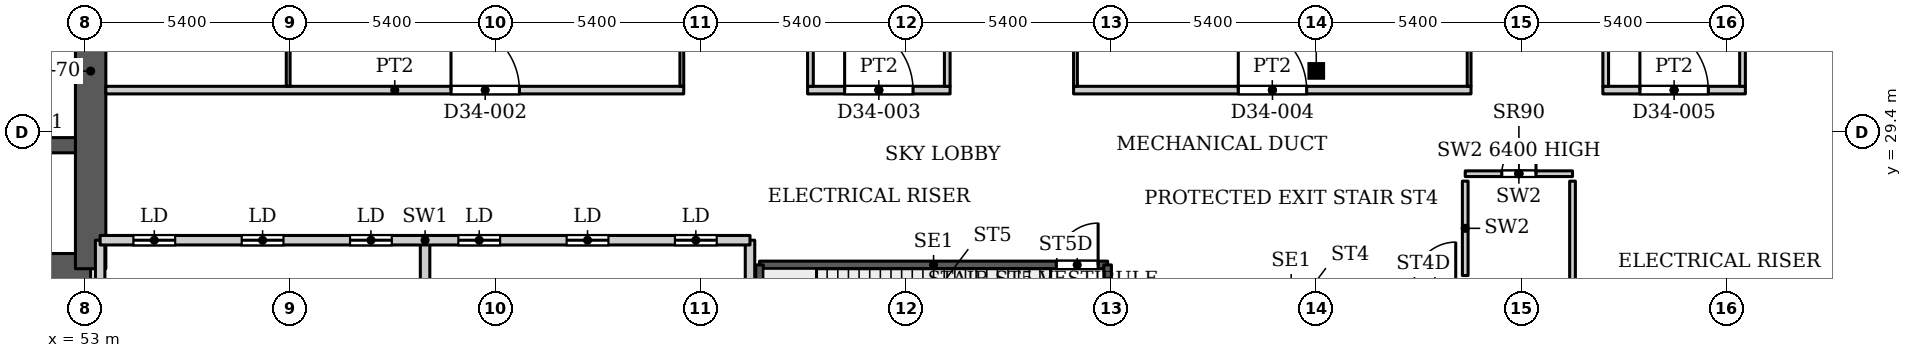
"""IFC4 building model, lengths in metres.
Left out: names, types, materials, properties, quantities, classifications, styles, units other than length and angle.
Written with IfcOpenShell. Run it as: python <this file> out.ifc"""

import sys

from ifc_helpers import new_model, si_unit, direction, frame, frame_2d, origin, origin_2d, place, context, subcontext, project, spatial, rectangle, hollow_rectangle, extrude, source, transform, mapped, element, fill, save


model = new_model("IFC4")
c1 = context("Model", 3, precision=1e-05, world=origin(), true_north=direction((0.0, 1.0)))
c2 = subcontext(c1, "Body", "Model", "MODEL_VIEW")
j1 = project(units=[si_unit("LENGTHUNIT", "METRE"), si_unit("PLANEANGLEUNIT", "RADIAN")], contexts=[c1])
p1 = place(None, origin())
s1 = spatial("IfcSite", under=j1, at=p1, CompositionType="ELEMENT")
p2 = place(p1, origin())
s2 = spatial("IfcBuilding", under=s1, at=p2, CompositionType="ELEMENT")
p3 = place(p2, frame((0.0, 0.0, 144.8)))
s3 = spatial("IfcBuildingStorey", under=s2, at=p3, CompositionType="ELEMENT", Elevation=144.8)
p4 = place(p3, frame((85.4, 31.005, 0.0), z_axis=(0.0, 0.0, 1.0), x_axis=(1.0, 0.0, 0.0)))
e1 = element("IfcColumn", 1, at=p4, inside=s3, PredefinedType="COLUMN", context=c2, shape_type="SweptSolid", body=[
    extrude(hollow_rectangle(XDim=0.305, YDim=0.305, WallThickness=0.016, InnerFilletRadius=0.016, OuterFilletRadius=0.032, at=origin_2d()), origin(), (0.0, 0.0, 1.0), 7.8),
])
p5 = place(p3, frame((34.75, 25.8, 0.0), z_axis=(0.0, 0.0, 1.0), x_axis=(1.0, 0.0, 0.0)))
e2 = element("IfcWall", 2, at=p5, inside=s3, PredefinedType="SHEAR", context=c2, shape_type="SweptSolid", body=[
    extrude(rectangle(XDim=18.4, YDim=0.8, at=frame_2d((9.2, 0.0))), origin(), (0.0, 0.0, 1.0), 7.8),
])
p6 = place(p3, frame((34.75, 29.05, 0.0), z_axis=(0.0, 0.0, 1.0), x_axis=(1.0, 0.0, 0.0)))
e3 = element("IfcWall", 3, at=p6, inside=s3, PredefinedType="SHEAR", context=c2, shape_type="SweptSolid", body=[
    extrude(rectangle(XDim=18.4, YDim=0.4, at=frame_2d((9.2, 0.0))), origin(), (0.0, 0.0, 1.0), 7.8),
])
p7 = place(p6, frame((0.875, 0.0, 0.0)))
e4 = element("IfcOpeningElement", 4, at=p7, cuts=e3, PredefinedType="OPENING", context=c2, shape_type="SweptSolid", body=[
    extrude(rectangle(XDim=1.1, YDim=2.2, at=frame_2d((0.55, 1.1))), frame((0.0, 0.21, 0.0), z_axis=(0.0, -1.0, 0.0), x_axis=(1.0, 0.0, 0.0)), (0.0, 0.0, 1.0), 0.42),
])
p8 = place(p6, frame((3.725, 0.0, 0.0)))
e5 = element("IfcOpeningElement", 5, at=p8, cuts=e3, PredefinedType="OPENING", context=c2, shape_type="SweptSolid", body=[
    extrude(rectangle(XDim=1.1, YDim=2.2, at=frame_2d((0.55, 1.1))), frame((0.0, 0.21, 0.0), z_axis=(0.0, -1.0, 0.0), x_axis=(1.0, 0.0, 0.0)), (0.0, 0.0, 1.0), 0.42),
])
p9 = place(p6, frame((6.575, 0.0, 0.0)))
e6 = element("IfcOpeningElement", 6, at=p9, cuts=e3, PredefinedType="OPENING", context=c2, shape_type="SweptSolid", body=[
    extrude(rectangle(XDim=1.1, YDim=2.2, at=frame_2d((0.55, 1.1))), frame((0.0, 0.21, 0.0), z_axis=(0.0, -1.0, 0.0), x_axis=(1.0, 0.0, 0.0)), (0.0, 0.0, 1.0), 0.42),
])
p10 = place(p6, frame((9.425, 0.0, 0.0)))
e7 = element("IfcOpeningElement", 7, at=p10, cuts=e3, PredefinedType="OPENING", context=c2, shape_type="SweptSolid", body=[
    extrude(rectangle(XDim=1.1, YDim=2.2, at=frame_2d((0.55, 1.1))), frame((0.0, 0.21, 0.0), z_axis=(0.0, -1.0, 0.0), x_axis=(1.0, 0.0, 0.0)), (0.0, 0.0, 1.0), 0.42),
])
p11 = place(p6, frame((12.275, 0.0, 0.0)))
e8 = element("IfcOpeningElement", 8, at=p11, cuts=e3, PredefinedType="OPENING", context=c2, shape_type="SweptSolid", body=[
    extrude(rectangle(XDim=1.1, YDim=2.2, at=frame_2d((0.55, 1.1))), frame((0.0, 0.21, 0.0), z_axis=(0.0, -1.0, 0.0), x_axis=(1.0, 0.0, 0.0)), (0.0, 0.0, 1.0), 0.42),
])
p12 = place(p6, frame((15.125, 0.0, 0.0)))
e9 = element("IfcOpeningElement", 9, at=p12, cuts=e3, PredefinedType="OPENING", context=c2, shape_type="SweptSolid", body=[
    extrude(rectangle(XDim=1.1, YDim=2.2, at=frame_2d((0.55, 1.1))), frame((0.0, 0.21, 0.0), z_axis=(0.0, -1.0, 0.0), x_axis=(1.0, 0.0, 0.0)), (0.0, 0.0, 1.0), 0.42),
])
p13 = place(p3, frame((53.15, 25.8, 0.0), z_axis=(0.0, 0.0, 1.0), x_axis=(0.0, 1.0, 0.0)))
e10 = element("IfcWall", 10, at=p13, inside=s3, PredefinedType="SHEAR", context=c2, shape_type="SweptSolid", body=[
    extrude(rectangle(XDim=10.4, YDim=0.8, at=frame_2d((5.2, 0.0))), origin(), (0.0, 0.0, 1.0), 7.8),
])
p14 = place(p13, frame((6.65, 0.0, 0.0)))
e11 = element("IfcOpeningElement", 11, at=p14, cuts=e10, PredefinedType="OPENING", context=c2, shape_type="SweptSolid", body=[
    extrude(rectangle(XDim=1.8, YDim=2.1, at=frame_2d((0.9, 1.05))), frame((0.0, 0.41, 0.0), z_axis=(0.0, -1.0, 0.0), x_axis=(1.0, 0.0, 0.0)), (0.0, 0.0, 1.0), 0.82),
])
p15 = place(p3, frame((70.75, 25.9, 0.0), z_axis=(0.0, 0.0, 1.0), x_axis=(1.0, 0.0, 0.0)))
e12 = element("IfcWall", 12, at=p15, inside=s3, PredefinedType="SHEAR", context=c2, shape_type="SweptSolid", body=[
    extrude(rectangle(XDim=9.16, YDim=0.2, at=frame_2d((4.58, 0.0))), origin(), (0.0, 0.0, 1.0), 7.8),
])
p16 = place(p15, frame((7.81, 0.0, 0.0)))
e13 = element("IfcOpeningElement", 13, at=p16, cuts=e12, PredefinedType="OPENING", context=c2, shape_type="SweptSolid", body=[
    extrude(rectangle(XDim=1.1, YDim=2.2, at=frame_2d((0.55, 1.1))), frame((0.0, 0.11, 0.0), z_axis=(0.0, -1.0, 0.0), x_axis=(1.0, 0.0, 0.0)), (0.0, 0.0, 1.0), 0.22),
])
for number, where, z_axis, x_axis in (
    (14, (70.75, 22.75, 0.0), (0.0, 0.0, 1.0), (0.0, 1.0, 0.0)),
    (15, (79.91, 22.75, 0.0), (0.0, 0.0, 1.0), (0.0, 1.0, 0.0)),
):
    element("IfcWall", number, at=place(p3, frame(where, z_axis=z_axis, x_axis=x_axis)), inside=s3, PredefinedType="SHEAR", context=c2, shape_type="SweptSolid", body=[
        extrude(rectangle(XDim=3.15, YDim=0.2, at=frame_2d((1.575, 0.0))), origin(), (0.0, 0.0, 1.0), 7.8),
    ])
for number, where, z_axis, x_axis in (
    (16, (53.4, 23.7, 0.0), (0.0, 0.0, 1.0), (0.0, 1.0, 0.0)),
    (17, (61.95, 23.7, 0.0), (0.0, 0.0, 1.0), (0.0, 1.0, 0.0)),
    (18, (70.5, 23.7, 0.0), (0.0, 0.0, 1.0), (0.0, 1.0, 0.0)),
):
    element("IfcWall", number, at=place(p3, frame(where, z_axis=z_axis, x_axis=x_axis)), inside=s3, PredefinedType="PARTITIONING", context=c2, shape_type="SweptSolid", body=[
        extrude(rectangle(XDim=2.85, YDim=0.25, at=frame_2d((1.425, 0.0))), origin(), (0.0, 0.0, 1.0), 7.8),
    ])
p17 = place(p3, frame((53.4, 26.55, 0.0), z_axis=(0.0, 0.0, 1.0), x_axis=(1.0, 0.0, 0.0)))
e19 = element("IfcWall", 19, at=p17, inside=s3, PredefinedType="PARTITIONING", context=c2, shape_type="SweptSolid", body=[
    extrude(rectangle(XDim=17.1, YDim=0.25, at=frame_2d((8.55, 0.0))), origin(), (0.0, 0.0, 1.0), 7.8),
])
p18 = place(p17, frame((0.875, 0.0, 0.0)))
e20 = element("IfcOpeningElement", 20, at=p18, cuts=e19, PredefinedType="OPENING", context=c2, shape_type="SweptSolid", body=[
    extrude(rectangle(XDim=1.1, YDim=2.2, at=frame_2d((0.55, 1.1))), frame((0.0, 0.135, 0.0), z_axis=(0.0, -1.0, 0.0), x_axis=(1.0, 0.0, 0.0)), (0.0, 0.0, 1.0), 0.27),
])
p19 = place(p17, frame((3.725, 0.0, 0.0)))
e21 = element("IfcOpeningElement", 21, at=p19, cuts=e19, PredefinedType="OPENING", context=c2, shape_type="SweptSolid", body=[
    extrude(rectangle(XDim=1.1, YDim=2.2, at=frame_2d((0.55, 1.1))), frame((0.0, 0.135, 0.0), z_axis=(0.0, -1.0, 0.0), x_axis=(1.0, 0.0, 0.0)), (0.0, 0.0, 1.0), 0.27),
])
p20 = place(p17, frame((6.575, 0.0, 0.0)))
e22 = element("IfcOpeningElement", 22, at=p20, cuts=e19, PredefinedType="OPENING", context=c2, shape_type="SweptSolid", body=[
    extrude(rectangle(XDim=1.1, YDim=2.2, at=frame_2d((0.55, 1.1))), frame((0.0, 0.135, 0.0), z_axis=(0.0, -1.0, 0.0), x_axis=(1.0, 0.0, 0.0)), (0.0, 0.0, 1.0), 0.27),
])
p21 = place(p17, frame((9.425, 0.0, 0.0)))
e23 = element("IfcOpeningElement", 23, at=p21, cuts=e19, PredefinedType="OPENING", context=c2, shape_type="SweptSolid", body=[
    extrude(rectangle(XDim=1.1, YDim=2.2, at=frame_2d((0.55, 1.1))), frame((0.0, 0.135, 0.0), z_axis=(0.0, -1.0, 0.0), x_axis=(1.0, 0.0, 0.0)), (0.0, 0.0, 1.0), 0.27),
])
p22 = place(p17, frame((12.275, 0.0, 0.0)))
e24 = element("IfcOpeningElement", 24, at=p22, cuts=e19, PredefinedType="OPENING", context=c2, shape_type="SweptSolid", body=[
    extrude(rectangle(XDim=1.1, YDim=2.2, at=frame_2d((0.55, 1.1))), frame((0.0, 0.135, 0.0), z_axis=(0.0, -1.0, 0.0), x_axis=(1.0, 0.0, 0.0)), (0.0, 0.0, 1.0), 0.27),
])
p23 = place(p17, frame((15.125, 0.0, 0.0)))
e25 = element("IfcOpeningElement", 25, at=p23, cuts=e19, PredefinedType="OPENING", context=c2, shape_type="SweptSolid", body=[
    extrude(rectangle(XDim=1.1, YDim=2.2, at=frame_2d((0.55, 1.1))), frame((0.0, 0.135, 0.0), z_axis=(0.0, -1.0, 0.0), x_axis=(1.0, 0.0, 0.0)), (0.0, 0.0, 1.0), 0.27),
])
p24 = place(p3, frame((89.32, 28.3, 0.0), z_axis=(0.0, 0.0, 1.0), x_axis=(1.0, 0.0, 0.0)))
e26 = element("IfcWall", 26, at=p24, inside=s3, PredefinedType="PARTITIONING", context=c2, shape_type="SweptSolid", body=[
    extrude(rectangle(XDim=2.823, YDim=0.15, at=frame_2d((1.412, 0.0))), origin(), (0.0, 0.0, 1.0), 6.4),
])
p25 = place(p24, frame((0.962, 0.0, 0.0)))
e27 = element("IfcOpeningElement", 27, at=p25, cuts=e26, PredefinedType="OPENING", context=c2, shape_type="SweptSolid", body=[
    extrude(rectangle(XDim=0.9, YDim=2.2, at=frame_2d((0.45, 1.1))), frame((0.0, 0.085, 0.0), z_axis=(0.0, -1.0, 0.0), x_axis=(1.0, 0.0, 0.0)), (0.0, 0.0, 1.0), 0.17),
])
p26 = place(p3, frame((89.32, 25.62, 0.0), z_axis=(0.0, 0.0, 1.0), x_axis=(0.0, 1.0, 0.0)))
e28 = element("IfcWall", 28, at=p26, inside=s3, PredefinedType="PARTITIONING", context=c2, shape_type="SweptSolid", body=[
    extrude(rectangle(XDim=2.485, YDim=0.15, at=frame_2d((1.242, 0.0))), origin(), (0.0, 0.0, 1.0), 7.8),
])
p27 = place(p3, frame((92.143, 21.422, 0.0), z_axis=(0.0, 0.0, 1.0), x_axis=(0.0, 1.0, 0.0)))
e29 = element("IfcWall", 29, at=p27, inside=s3, PredefinedType="PARTITIONING", context=c2, shape_type="SweptSolid", body=[
    extrude(rectangle(XDim=6.683, YDim=0.15, at=frame_2d((3.341, 0.0))), origin(), (0.0, 0.0, 1.0), 7.8),
])
p28 = place(p3, frame((53.549, 30.5, 0.0), z_axis=(0.0, 0.0, 1.0), x_axis=(1.0, 0.0, 0.0)))
e30 = element("IfcWall", 30, at=p28, inside=s3, PredefinedType="PARTITIONING", context=c2, shape_type="SweptSolid", body=[
    extrude(rectangle(XDim=15.207, YDim=0.2, at=frame_2d((7.604, 0.0))), origin(), (0.0, 0.0, 1.0), 7.5),
])
p29 = place(p28, frame((9.083, 0.0, 0.0)))
e31 = element("IfcOpeningElement", 31, at=p29, cuts=e30, PredefinedType="OPENING", context=c2, shape_type="SweptSolid", body=[
    extrude(rectangle(XDim=1.8, YDim=2.1, at=frame_2d((0.9, 1.05))), frame((0.0, 0.11, 0.0), z_axis=(0.0, -1.0, 0.0), x_axis=(1.0, 0.0, 0.0)), (0.0, 0.0, 1.0), 0.22),
])
p30 = place(p3, frame((58.348, 30.6, 0.0), z_axis=(0.0, 0.0, 1.0), x_axis=(0.0, 1.0, 0.0)))
e32 = element("IfcWall", 32, at=p30, inside=s3, PredefinedType="PARTITIONING", context=c2, shape_type="SweptSolid", body=[
    extrude(rectangle(XDim=13.37, YDim=0.1, at=frame_2d((6.685, 0.0))), origin(), (0.0, 0.0, 1.0), 6.972),
])
p31 = place(p3, frame((68.706, 30.6, 0.0), z_axis=(0.0, 0.0, 1.0), x_axis=(0.0, 1.0, 0.0)))
e33 = element("IfcWall", 33, at=p31, inside=s3, PredefinedType="PARTITIONING", context=c2, shape_type="SweptSolid", body=[
    extrude(rectangle(XDim=13.37, YDim=0.1, at=frame_2d((6.685, 0.0))), origin(), (0.0, 0.0, 1.0), 7.5),
])
p32 = place(p3, frame((72.015, 30.5, 0.0), z_axis=(0.0, 0.0, 1.0), x_axis=(1.0, 0.0, 0.0)))
e34 = element("IfcWall", 34, at=p32, inside=s3, PredefinedType="PARTITIONING", context=c2, shape_type="SweptSolid", body=[
    extrude(rectangle(XDim=3.75, YDim=0.2, at=frame_2d((1.875, 0.0))), origin(), (0.0, 0.0, 1.0), 7.5),
])
p33 = place(p32, frame((0.975, 0.0, 0.0)))
e35 = element("IfcOpeningElement", 35, at=p33, cuts=e34, PredefinedType="OPENING", context=c2, shape_type="SweptSolid", body=[
    extrude(rectangle(XDim=1.8, YDim=2.1, at=frame_2d((0.9, 1.05))), frame((0.0, 0.11, 0.0), z_axis=(0.0, -1.0, 0.0), x_axis=(1.0, 0.0, 0.0)), (0.0, 0.0, 1.0), 0.22),
])
for number, where, z_axis, x_axis in (
    (36, (72.09, 30.6, 0.0), (0.0, 0.0, 1.0), (0.0, 1.0, 0.0)),
    (37, (75.69, 30.6, 0.0), (0.0, 0.0, 1.0), (0.0, 1.0, 0.0)),
):
    element("IfcWall", number, at=place(p3, frame(where, z_axis=z_axis, x_axis=x_axis)), inside=s3, PredefinedType="PARTITIONING", context=c2, shape_type="SweptSolid", body=[
        extrude(rectangle(XDim=3.025, YDim=0.15, at=frame_2d((1.512, 0.0))), origin(), (0.0, 0.0, 1.0), 7.5),
    ])
p34 = place(p3, frame((79.014, 30.5, 0.0), z_axis=(0.0, 0.0, 1.0), x_axis=(1.0, 0.0, 0.0)))
e38 = element("IfcWall", 38, at=p34, inside=s3, PredefinedType="PARTITIONING", context=c2, shape_type="SweptSolid", body=[
    extrude(rectangle(XDim=10.458, YDim=0.2, at=frame_2d((5.229, 0.0))), origin(), (0.0, 0.0, 1.0), 7.5),
])
p35 = place(p34, frame((4.334, 0.0, 0.0)))
e39 = element("IfcOpeningElement", 39, at=p35, cuts=e38, PredefinedType="OPENING", context=c2, shape_type="SweptSolid", body=[
    extrude(rectangle(XDim=1.8, YDim=2.1, at=frame_2d((0.9, 1.05))), frame((0.0, 0.11, 0.0), z_axis=(0.0, -1.0, 0.0), x_axis=(1.0, 0.0, 0.0)), (0.0, 0.0, 1.0), 0.22),
])
for number, where, z_axis, x_axis in (
    (40, (79.064, 30.6, 0.0), (0.0, 0.0, 1.0), (0.0, 1.0, 0.0)),
    (41, (89.422, 30.6, 0.0), (0.0, 0.0, 1.0), (0.0, 1.0, 0.0)),
):
    element("IfcWall", number, at=place(p3, frame(where, z_axis=z_axis, x_axis=x_axis)), inside=s3, PredefinedType="PARTITIONING", context=c2, shape_type="SweptSolid", body=[
        extrude(rectangle(XDim=13.37, YDim=0.1, at=frame_2d((6.685, 0.0))), origin(), (0.0, 0.0, 1.0), 7.5),
    ])
p36 = place(p3, frame((92.941, 30.5, 0.0), z_axis=(0.0, 0.0, 1.0), x_axis=(1.0, 0.0, 0.0)))
e42 = element("IfcWall", 42, at=p36, inside=s3, PredefinedType="PARTITIONING", context=c2, shape_type="SweptSolid", body=[
    extrude(rectangle(XDim=3.75, YDim=0.2, at=frame_2d((1.875, 0.0))), origin(), (0.0, 0.0, 1.0), 7.5),
])
p37 = place(p36, frame((0.975, 0.0, 0.0)))
e43 = element("IfcOpeningElement", 43, at=p37, cuts=e42, PredefinedType="OPENING", context=c2, shape_type="SweptSolid", body=[
    extrude(rectangle(XDim=1.8, YDim=2.1, at=frame_2d((0.9, 1.05))), frame((0.0, 0.11, 0.0), z_axis=(0.0, -1.0, 0.0), x_axis=(1.0, 0.0, 0.0)), (0.0, 0.0, 1.0), 0.22),
])
for number, where, z_axis, x_axis in (
    (44, (93.016, 30.6, 0.0), (0.0, 0.0, 1.0), (0.0, 1.0, 0.0)),
    (45, (96.616, 30.6, 0.0), (0.0, 0.0, 1.0), (0.0, 1.0, 0.0)),
):
    element("IfcWall", number, at=place(p3, frame(where, z_axis=z_axis, x_axis=x_axis)), inside=s3, PredefinedType="PARTITIONING", context=c2, shape_type="SweptSolid", body=[
        extrude(rectangle(XDim=3.025, YDim=0.15, at=frame_2d((1.512, 0.0))), origin(), (0.0, 0.0, 1.0), 7.5),
    ])
m1 = source(origin(), c2, "Body", "SweptSolid", [
    extrude(rectangle(XDim=1.1, YDim=2.2, at=frame_2d((0.55, 1.1))), frame((0.0, 0.025, 0.0), z_axis=(0.0, -1.0, 0.0), x_axis=(1.0, 0.0, 0.0)), (0.0, 0.0, 1.0), 0.05),
])
p38 = place(p18, origin())
e46 = element("IfcDoor", 46, at=p38, inside=s3, OperationType="SLIDING_TO_LEFT", PredefinedType="DOOR", context=c2, shape_type="MappedRepresentation", body=[
    mapped(m1, transform((0.0, 0.0, 0.0), x_axis=(1.0, 0.0, 0.0), y_axis=(0.0, 1.0, 0.0), z_axis=(0.0, 0.0, 1.0), scale=1.0)),
])
fill(e20, e46)
p39 = place(p19, origin())
e47 = element("IfcDoor", 47, at=p39, inside=s3, OperationType="SLIDING_TO_LEFT", PredefinedType="DOOR", context=c2, shape_type="MappedRepresentation", body=[
    mapped(m1, transform((0.0, 0.0, 0.0), x_axis=(1.0, 0.0, 0.0), y_axis=(0.0, 1.0, 0.0), z_axis=(0.0, 0.0, 1.0), scale=1.0)),
])
fill(e21, e47)
p40 = place(p20, origin())
e48 = element("IfcDoor", 48, at=p40, inside=s3, OperationType="SLIDING_TO_LEFT", PredefinedType="DOOR", context=c2, shape_type="MappedRepresentation", body=[
    mapped(m1, transform((0.0, 0.0, 0.0), x_axis=(1.0, 0.0, 0.0), y_axis=(0.0, 1.0, 0.0), z_axis=(0.0, 0.0, 1.0), scale=1.0)),
])
fill(e22, e48)
p41 = place(p21, origin())
e49 = element("IfcDoor", 49, at=p41, inside=s3, OperationType="SLIDING_TO_LEFT", PredefinedType="DOOR", context=c2, shape_type="MappedRepresentation", body=[
    mapped(m1, transform((0.0, 0.0, 0.0), x_axis=(1.0, 0.0, 0.0), y_axis=(0.0, 1.0, 0.0), z_axis=(0.0, 0.0, 1.0), scale=1.0)),
])
fill(e23, e49)
p42 = place(p22, origin())
e50 = element("IfcDoor", 50, at=p42, inside=s3, OperationType="SLIDING_TO_LEFT", PredefinedType="DOOR", context=c2, shape_type="MappedRepresentation", body=[
    mapped(m1, transform((0.0, 0.0, 0.0), x_axis=(1.0, 0.0, 0.0), y_axis=(0.0, 1.0, 0.0), z_axis=(0.0, 0.0, 1.0), scale=1.0)),
])
fill(e24, e50)
p43 = place(p23, origin())
e51 = element("IfcDoor", 51, at=p43, inside=s3, OperationType="SLIDING_TO_LEFT", PredefinedType="DOOR", context=c2, shape_type="MappedRepresentation", body=[
    mapped(m1, transform((0.0, 0.0, 0.0), x_axis=(1.0, 0.0, 0.0), y_axis=(0.0, 1.0, 0.0), z_axis=(0.0, 0.0, 1.0), scale=1.0)),
])
fill(e25, e51)
m2 = source(origin(), c2, "Body", "SweptSolid", [
    extrude(rectangle(XDim=0.9, YDim=2.2, at=frame_2d((0.45, 1.1))), frame((0.0, 0.025, 0.0), z_axis=(0.0, -1.0, 0.0), x_axis=(1.0, 0.0, 0.0)), (0.0, 0.0, 1.0), 0.05),
])
p44 = place(p25, origin())
e52 = element("IfcDoor", 52, at=p44, inside=s3, OperationType="SINGLE_SWING_LEFT", PredefinedType="DOOR", context=c2, shape_type="MappedRepresentation", body=[
    mapped(m2, transform((0.0, 0.0, 0.0), x_axis=(1.0, 0.0, 0.0), y_axis=(0.0, 1.0, 0.0), z_axis=(0.0, 0.0, 1.0), scale=1.0)),
])
fill(e27, e52)
m3 = source(origin(), c2, "Body", "SweptSolid", [
    extrude(rectangle(XDim=1.1, YDim=2.2, at=frame_2d((0.55, 1.1))), frame((0.0, 0.025, 0.0), z_axis=(0.0, -1.0, 0.0), x_axis=(1.0, 0.0, 0.0)), (0.0, 0.0, 1.0), 0.05),
])
p45 = place(p16, origin())
e53 = element("IfcDoor", 53, at=p45, inside=s3, OperationType="SINGLE_SWING_LEFT", PredefinedType="DOOR", context=c2, shape_type="MappedRepresentation", body=[
    mapped(m3, transform((0.0, 0.0, 0.0), x_axis=(1.0, 0.0, 0.0), y_axis=(0.0, 1.0, 0.0), z_axis=(0.0, 0.0, 1.0), scale=1.0)),
])
fill(e13, e53)
m4 = source(origin(), c2, "Body", "SweptSolid", [
    extrude(rectangle(XDim=1.8, YDim=2.1, at=frame_2d((0.9, 1.05))), frame((0.0, 0.025, 0.0), z_axis=(0.0, -1.0, 0.0), x_axis=(1.0, 0.0, 0.0)), (0.0, 0.0, 1.0), 0.05),
])
p46 = place(p29, origin())
e54 = element("IfcDoor", 54, at=p46, inside=s3, OperationType="DOUBLE_DOOR_SINGLE_SWING", PredefinedType="DOOR", context=c2, shape_type="MappedRepresentation", body=[
    mapped(m4, transform((0.0, 0.0, 0.0), x_axis=(1.0, 0.0, 0.0), y_axis=(0.0, 1.0, 0.0), z_axis=(0.0, 0.0, 1.0), scale=1.0)),
])
fill(e31, e54)
p47 = place(p33, origin())
e55 = element("IfcDoor", 55, at=p47, inside=s3, OperationType="DOUBLE_DOOR_SINGLE_SWING", PredefinedType="DOOR", context=c2, shape_type="MappedRepresentation", body=[
    mapped(m4, transform((0.0, 0.0, 0.0), x_axis=(1.0, 0.0, 0.0), y_axis=(0.0, 1.0, 0.0), z_axis=(0.0, 0.0, 1.0), scale=1.0)),
])
fill(e35, e55)
p48 = place(p35, origin())
e56 = element("IfcDoor", 56, at=p48, inside=s3, OperationType="DOUBLE_DOOR_SINGLE_SWING", PredefinedType="DOOR", context=c2, shape_type="MappedRepresentation", body=[
    mapped(m4, transform((0.0, 0.0, 0.0), x_axis=(1.0, 0.0, 0.0), y_axis=(0.0, 1.0, 0.0), z_axis=(0.0, 0.0, 1.0), scale=1.0)),
])
fill(e39, e56)
p49 = place(p37, origin())
e57 = element("IfcDoor", 57, at=p49, inside=s3, OperationType="DOUBLE_DOOR_SINGLE_SWING", PredefinedType="DOOR", context=c2, shape_type="MappedRepresentation", body=[
    mapped(m4, transform((0.0, 0.0, 0.0), x_axis=(1.0, 0.0, 0.0), y_axis=(0.0, 1.0, 0.0), z_axis=(0.0, 0.0, 1.0), scale=1.0)),
])
fill(e43, e57)
save(model, sys.argv[1])
